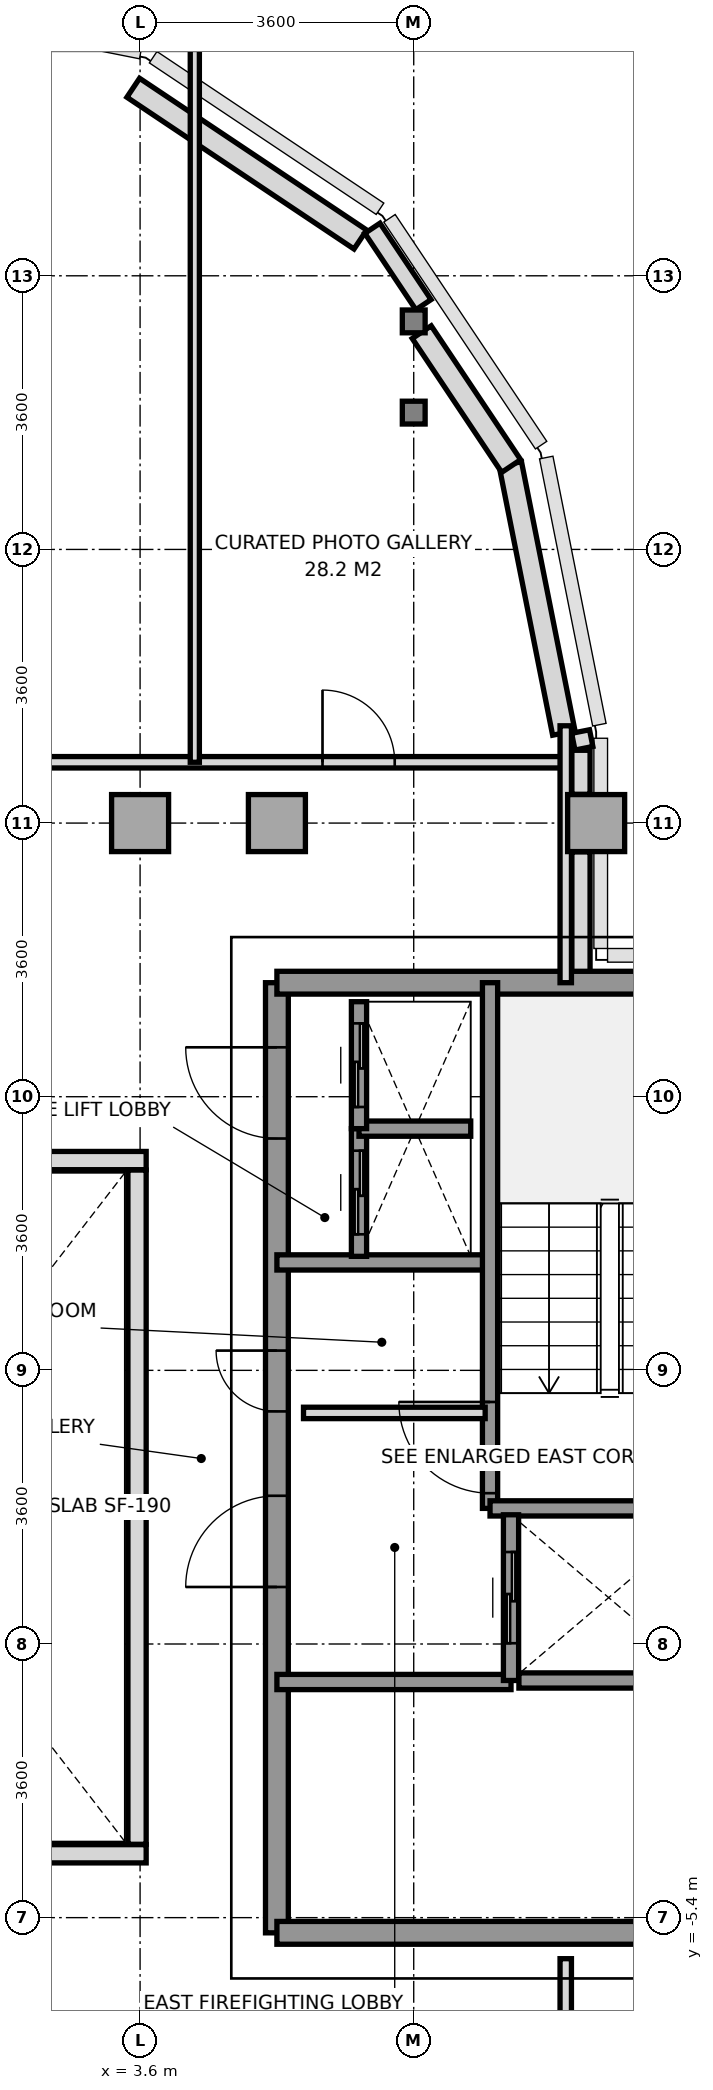
"""IFC4 building model, lengths in metres.
Left out: names, types, materials, properties, quantities, classifications, styles, units other than length and angle.
Written with IfcOpenShell. Run it as: python <this file> out.ifc"""

import sys

from ifc_helpers import new_model, si_unit, direction, frame, frame_2d, origin, origin_2d, place, context, subcontext, project, spatial, rectangle, i_section, extrude, source, transform, mapped, element, fill, save


model = new_model("IFC4")
c1 = context("Model", 3, precision=1e-05, world=origin(), true_north=direction((0.0, 1.0)))
c2 = subcontext(c1, "Body", "Model", "MODEL_VIEW")
j1 = project(units=[si_unit("LENGTHUNIT", "METRE"), si_unit("PLANEANGLEUNIT", "RADIAN")], contexts=[c1])
p1 = place(None, origin())
s1 = spatial("IfcSite", under=j1, at=p1, CompositionType="ELEMENT")
p2 = place(p1, origin())
s2 = spatial("IfcBuilding", under=s1, at=p2, CompositionType="ELEMENT")
p3 = place(p2, frame((0.0, 0.0, 242.8)))
s3 = spatial("IfcBuildingStorey", under=s2, at=p3, CompositionType="ELEMENT", Elevation=242.8)
m1 = source(origin(), c2, "Body", "SweptSolid", [
    extrude(rectangle(XDim=0.75, YDim=0.75, at=origin_2d()), origin(), (0.0, 0.0, 1.0), 3.01),
])
for number, where, z_axis, x_axis in (
    (1, (3.6, 9.0, 0.0), (0.0, 0.0, 1.0), (1.0, 0.0, 0.0)),
    (2, (5.4, 9.0, 0.0), (0.0, 0.0, 1.0), (1.0, 0.0, 0.0)),
):
    element("IfcColumn", number, at=place(p3, frame(where, z_axis=z_axis, x_axis=x_axis)), inside=s3, PredefinedType="COLUMN", context=c2, shape_type="MappedRepresentation", body=[
        mapped(m1, transform((0.0, 0.0, 0.0), x_axis=(1.0, 0.0, 0.0), y_axis=(0.0, 1.0, 0.0), z_axis=(0.0, 0.0, 1.0), scale=1.0)),
    ])
m2 = source(origin(), c2, "Body", "SweptSolid", [
    extrude(i_section(OverallWidth=0.3, OverallDepth=0.3, WebThickness=0.011, FlangeThickness=0.019, at=origin_2d()), origin(), (0.0, 0.0, 1.0), 3.01),
])
for number, where, z_axis, x_axis in (
    (3, (7.2, 14.4, 0.0), (0.0, 0.0, 1.0), (1.0, 0.0, 0.0)),
    (4, (7.2, 15.6, 0.0), (0.0, 0.0, 1.0), (1.0, 0.0, 0.0)),
):
    element("IfcColumn", number, at=place(p3, frame(where, z_axis=z_axis, x_axis=x_axis)), inside=s3, PredefinedType="COLUMN", context=c2, shape_type="MappedRepresentation", body=[
        mapped(m2, transform((0.0, 0.0, 0.0), x_axis=(1.0, 0.0, 0.0), y_axis=(0.0, 1.0, 0.0), z_axis=(0.0, 0.0, 1.0), scale=1.0)),
    ])
p4 = place(p3, frame((9.6, 9.0, 0.0), z_axis=(0.0, 0.0, 1.0), x_axis=(1.0, 0.0, 0.0)))
e5 = element("IfcColumn", 5, at=p4, inside=s3, PredefinedType="COLUMN", context=c2, shape_type="MappedRepresentation", body=[
    mapped(m1, transform((0.0, 0.0, 0.0), x_axis=(1.0, 0.0, 0.0), y_axis=(0.0, 1.0, 0.0), z_axis=(0.0, 0.0, 1.0), scale=1.0)),
])
p5 = place(p3, frame((9.175, 10.185, 0.0), z_axis=(0.0, 0.0, 1.0), x_axis=(-0.195114232679, 0.980780523974, 0.0)))
e6 = element("IfcWall", 6, at=p5, inside=s3, PredefinedType="SOLIDWALL", context=c2, shape_type="SweptSolid", body=[
    extrude(rectangle(XDim=3.609, YDim=0.3, at=frame_2d((1.804, 0.0))), origin(), (0.0, 0.0, 1.0), 3.01),
])
p6 = place(p3, frame((8.482, 13.698, 0.0), z_axis=(0.0, 0.0, 1.0), x_axis=(-0.555604299396, 0.831446848868, 0.0)))
e7 = element("IfcWall", 7, at=p6, inside=s3, PredefinedType="SOLIDWALL", context=c2, shape_type="SweptSolid", body=[
    extrude(rectangle(XDim=2.118, YDim=0.3, at=frame_2d((1.059, 0.0))), origin(), (0.0, 0.0, 1.0), 2.61),
])
p7 = place(p3, frame((6.498, 16.677, 0.0), z_axis=(0.0, 0.0, 1.0), x_axis=(-0.831443568068, 0.555609208993, 0.0)))
e8 = element("IfcWall", 8, at=p7, inside=s3, PredefinedType="SOLIDWALL", context=c2, shape_type="SweptSolid", body=[
    extrude(rectangle(XDim=3.594, YDim=0.3, at=frame_2d((1.797, 0.0))), origin(), (0.0, 0.0, 1.0), 3.01),
])
p8 = place(p3, frame((6.656, 16.825, 0.0), z_axis=(0.0, 0.0, 1.0), x_axis=(0.555585388542, -0.831459485506, 0.0)))
e9 = element("IfcWall", 9, at=p8, inside=s3, PredefinedType="PARAPET", context=c2, shape_type="SweptSolid", body=[
    extrude(rectangle(XDim=1.209, YDim=0.24, at=frame_2d((0.604, 0.0))), origin(), (0.0, 0.0, 1.0), 1.15),
])
p9 = place(p3, frame((9.395, 10.204, 0.0), z_axis=(0.0, 0.0, 1.0), x_axis=(0.194859894132, -0.980831087221, 0.0)))
e10 = element("IfcWall", 10, at=p9, inside=s3, PredefinedType="PARAPET", context=c2, shape_type="SweptSolid", body=[
    extrude(rectangle(XDim=0.224, YDim=0.24, at=frame_2d((0.112, 0.0))), origin(), (0.0, 0.0, 1.0), 1.15),
])
p10 = place(p3, frame((9.4, 9.958, 0.0), z_axis=(0.0, 0.0, 1.0), x_axis=(0.0, -1.0, 0.0)))
e11 = element("IfcWall", 11, at=p10, inside=s3, PredefinedType="PARAPET", context=c2, shape_type="SweptSolid", body=[
    extrude(rectangle(XDim=0.58, YDim=0.24, at=frame_2d((0.29, 0.0))), origin(), (0.0, 0.0, 1.0), 1.15),
])
p11 = place(p3, frame((9.4, 8.622, 0.0), z_axis=(0.0, 0.0, 1.0), x_axis=(0.0, -1.0, 0.0)))
e12 = element("IfcWall", 12, at=p11, inside=s3, PredefinedType="PARAPET", context=c2, shape_type="SweptSolid", body=[
    extrude(rectangle(XDim=1.669, YDim=0.24, at=frame_2d((0.834, 0.0))), origin(), (0.0, 0.0, 1.0), 1.15),
])
p12 = place(p3, frame((5.4, -5.6, 0.0), z_axis=(0.0, 0.0, 1.0), x_axis=(0.0, 1.0, 0.0)))
e13 = element("IfcWall", 13, at=p12, inside=s3, PredefinedType="SHEAR", context=c2, shape_type="SweptSolid", body=[
    extrude(rectangle(XDim=12.5, YDim=0.3, at=frame_2d((6.25, 0.0))), origin(), (0.0, 0.0, 1.0), 3.01),
])
p13 = place(p12, frame((4.55, 0.0, 0.0)))
e14 = element("IfcOpeningElement", 14, at=p13, cuts=e13, PredefinedType="OPENING", context=c2, shape_type="SweptSolid", body=[
    extrude(rectangle(XDim=1.2, YDim=2.2, at=frame_2d((0.6, 1.1))), frame((0.0, 0.16, 0.0), z_axis=(0.0, -1.0, 0.0), x_axis=(1.0, 0.0, 0.0)), (0.0, 0.0, 1.0), 0.32),
])
p14 = place(p12, frame((10.45, 0.0, 0.0)))
e15 = element("IfcOpeningElement", 15, at=p14, cuts=e13, PredefinedType="OPENING", context=c2, shape_type="SweptSolid", body=[
    extrude(rectangle(XDim=1.2, YDim=2.2, at=frame_2d((0.6, 1.1))), frame((0.0, 0.16, 0.0), z_axis=(0.0, -1.0, 0.0), x_axis=(1.0, 0.0, 0.0)), (0.0, 0.0, 1.0), 0.32),
])
p15 = place(p12, frame((6.86, 0.0, 0.0)))
e16 = element("IfcOpeningElement", 16, at=p15, cuts=e13, PredefinedType="OPENING", context=c2, shape_type="SweptSolid", body=[
    extrude(rectangle(XDim=0.8, YDim=2.1, at=frame_2d((0.4, 1.05))), frame((0.0, 0.16, 0.0), z_axis=(0.0, -1.0, 0.0), x_axis=(1.0, 0.0, 0.0)), (0.0, 0.0, 1.0), 0.32),
])
p16 = place(p3, frame((5.4, 6.9, 0.0), z_axis=(0.0, 0.0, 1.0), x_axis=(1.0, 0.0, 0.0)))
e17 = element("IfcWall", 17, at=p16, inside=s3, PredefinedType="SHEAR", context=c2, shape_type="SweptSolid", body=[
    extrude(rectangle(XDim=5.956, YDim=0.3, at=frame_2d((2.978, 0.0))), origin(), (0.0, 0.0, 1.0), 3.01),
])
p17 = place(p3, frame((5.4, -5.6, 0.0), z_axis=(0.0, 0.0, 1.0), x_axis=(1.0, 0.0, 0.0)))
e18 = element("IfcWall", 18, at=p17, inside=s3, PredefinedType="SHEAR", context=c2, shape_type="SweptSolid", body=[
    extrude(rectangle(XDim=7.8, YDim=0.3, at=frame_2d((3.9, 0.0))), origin(), (0.0, 0.0, 1.0), 3.01),
])
p18 = place(p3, frame((5.4, 3.22, 0.0), z_axis=(0.0, 0.0, 1.0), x_axis=(1.0, 0.0, 0.0)))
e19 = element("IfcWall", 19, at=p18, inside=s3, PredefinedType="SOLIDWALL", context=c2, shape_type="SweptSolid", body=[
    extrude(rectangle(XDim=2.78, YDim=0.2, at=frame_2d((1.39, 0.0))), origin(), (0.0, 0.0, 1.0), 3.01),
])
p19 = place(p3, frame((5.4, -2.3, 0.0), z_axis=(0.0, 0.0, 1.0), x_axis=(1.0, 0.0, 0.0)))
e20 = element("IfcWall", 20, at=p19, inside=s3, PredefinedType="SOLIDWALL", context=c2, shape_type="SweptSolid", body=[
    extrude(rectangle(XDim=3.08, YDim=0.2, at=frame_2d((1.54, 0.0))), origin(), (0.0, 0.0, 1.0), 3.01),
])
p20 = place(p3, frame((8.204, -0.016, 0.0), z_axis=(0.0, 0.0, 1.0), x_axis=(0.0, 1.0, 0.0)))
e21 = element("IfcWall", 21, at=p20, inside=s3, PredefinedType="SOLIDWALL", context=c2, shape_type="SweptSolid", body=[
    extrude(rectangle(XDim=6.916, YDim=0.2, at=frame_2d((3.458, 0.0))), origin(), (0.0, 0.0, 1.0), 3.01),
])
p21 = place(p20, frame((0.2, 0.0, 0.0)))
e22 = element("IfcOpeningElement", 22, at=p21, cuts=e21, PredefinedType="OPENING", context=c2, shape_type="SweptSolid", body=[
    extrude(rectangle(XDim=1.2, YDim=2.2, at=frame_2d((0.6, 1.1))), frame((0.0, 0.11, 0.0), z_axis=(0.0, -1.0, 0.0), x_axis=(1.0, 0.0, 0.0)), (0.0, 0.0, 1.0), 0.22),
])
p22 = place(p3, frame((8.204, -0.016, 0.0), z_axis=(0.0, 0.0, 1.0), x_axis=(1.0, 0.0, 0.0)))
e23 = element("IfcWall", 23, at=p22, inside=s3, PredefinedType="SOLIDWALL", context=c2, shape_type="SweptSolid", body=[
    extrude(rectangle(XDim=3.152, YDim=0.2, at=frame_2d((1.576, 0.0))), origin(), (0.0, 0.0, 1.0), 3.01),
])
p23 = place(p3, frame((8.48, -2.28, 0.0), z_axis=(0.0, 0.0, 1.0), x_axis=(0.0, 1.0, 0.0)))
e24 = element("IfcWall", 24, at=p23, inside=s3, PredefinedType="SOLIDWALL", context=c2, shape_type="SweptSolid", body=[
    extrude(rectangle(XDim=2.18, YDim=0.2, at=frame_2d((1.09, 0.0))), origin(), (0.0, 0.0, 1.0), 3.01),
])
p24 = place(p23, frame((0.49, 0.0, 0.0)))
e25 = element("IfcOpeningElement", 25, at=p24, cuts=e24, PredefinedType="OPENING", context=c2, shape_type="SweptSolid", body=[
    extrude(rectangle(XDim=1.2, YDim=2.2, at=frame_2d((0.6, 1.1))), frame((0.0, 0.11, 0.0), z_axis=(0.0, -1.0, 0.0), x_axis=(1.0, 0.0, 0.0)), (0.0, 0.0, 1.0), 0.22),
])
p25 = place(p3, frame((8.584, -2.28, 0.0), z_axis=(0.0, 0.0, 1.0), x_axis=(1.0, 0.0, 0.0)))
e26 = element("IfcWall", 26, at=p25, inside=s3, PredefinedType="SOLIDWALL", context=c2, shape_type="SweptSolid", body=[
    extrude(rectangle(XDim=2.362, YDim=0.2, at=frame_2d((1.181, 0.0))), origin(), (0.0, 0.0, 1.0), 3.01),
])
p26 = place(p3, frame((6.48, 3.3, 0.0), z_axis=(0.0, 0.0, 1.0), x_axis=(0.0, 1.0, 0.0)))
e27 = element("IfcWall", 27, at=p26, inside=s3, PredefinedType="SOLIDWALL", context=c2, shape_type="SweptSolid", body=[
    extrude(rectangle(XDim=1.68, YDim=0.2, at=frame_2d((0.84, 0.0))), origin(), (0.0, 0.0, 1.0), 3.01),
])
p27 = place(p26, frame((0.29, 0.0, 0.0)))
e28 = element("IfcOpeningElement", 28, at=p27, cuts=e27, PredefinedType="OPENING", context=c2, shape_type="SweptSolid", body=[
    extrude(rectangle(XDim=1.1, YDim=2.2, at=frame_2d((0.55, 1.1))), frame((0.0, 0.11, 0.0), z_axis=(0.0, -1.0, 0.0), x_axis=(1.0, 0.0, 0.0)), (0.0, 0.0, 1.0), 0.22),
])
p28 = place(p3, frame((6.48, 4.98, 0.0), z_axis=(0.0, 0.0, 1.0), x_axis=(1.0, 0.0, 0.0)))
e29 = element("IfcWall", 29, at=p28, inside=s3, PredefinedType="SOLIDWALL", context=c2, shape_type="SweptSolid", body=[
    extrude(rectangle(XDim=1.47, YDim=0.2, at=frame_2d((0.735, 0.0))), origin(), (0.0, 0.0, 1.0), 3.01),
])
p29 = place(p3, frame((6.48, 4.98, 0.0), z_axis=(0.0, 0.0, 1.0), x_axis=(0.0, 1.0, 0.0)))
e30 = element("IfcWall", 30, at=p29, inside=s3, PredefinedType="SOLIDWALL", context=c2, shape_type="SweptSolid", body=[
    extrude(rectangle(XDim=1.67, YDim=0.2, at=frame_2d((0.835, 0.0))), origin(), (0.0, 0.0, 1.0), 3.01),
])
p30 = place(p29, frame((0.285, 0.0, 0.0)))
e31 = element("IfcOpeningElement", 31, at=p30, cuts=e30, PredefinedType="OPENING", context=c2, shape_type="SweptSolid", body=[
    extrude(rectangle(XDim=1.1, YDim=2.2, at=frame_2d((0.55, 1.1))), frame((0.0, 0.11, 0.0), z_axis=(0.0, -1.0, 0.0), x_axis=(1.0, 0.0, 0.0)), (0.0, 0.0, 1.0), 0.22),
])
p31 = place(p3, frame((5.75, 1.24, 0.0), z_axis=(0.0, 0.0, 1.0), x_axis=(1.0, 0.0, 0.0)))
e32 = element("IfcWall", 32, at=p31, inside=s3, PredefinedType="PARTITIONING", context=c2, shape_type="SweptSolid", body=[
    extrude(rectangle(XDim=2.39, YDim=0.15, at=frame_2d((1.195, 0.0))), origin(), (0.0, 0.0, 1.0), 3.01),
])
p32 = place(p3, frame((-9.2, 9.8, 0.0), z_axis=(0.0, 0.0, 1.0), x_axis=(1.0, 0.0, 0.0)))
e33 = element("IfcWall", 33, at=p32, inside=s3, PredefinedType="PARTITIONING", context=c2, shape_type="SweptSolid", body=[
    extrude(rectangle(XDim=18.4, YDim=0.15, at=frame_2d((9.2, 0.0))), origin(), (0.0, 0.0, 1.0), 3.01),
])
p33 = place(p32, frame((2.2, 0.0, 0.0)))
e34 = element("IfcOpeningElement", 34, at=p33, cuts=e33, PredefinedType="OPENING", context=c2, shape_type="SweptSolid", body=[
    extrude(rectangle(XDim=0.95, YDim=2.15, at=frame_2d((0.475, 1.075))), frame((0.0, 0.085, 0.0), z_axis=(0.0, -1.0, 0.0), x_axis=(1.0, 0.0, 0.0)), (0.0, 0.0, 1.0), 0.17),
])
p34 = place(p32, frame((8.8, 0.0, 0.0)))
e35 = element("IfcOpeningElement", 35, at=p34, cuts=e33, PredefinedType="OPENING", context=c2, shape_type="SweptSolid", body=[
    extrude(rectangle(XDim=1.1, YDim=2.2, at=frame_2d((0.55, 1.1))), frame((0.0, 0.085, 0.0), z_axis=(0.0, -1.0, 0.0), x_axis=(1.0, 0.0, 0.0)), (0.0, 0.0, 1.0), 0.17),
])
p35 = place(p32, frame((15.2, 0.0, 0.0)))
e36 = element("IfcOpeningElement", 36, at=p35, cuts=e33, PredefinedType="OPENING", context=c2, shape_type="SweptSolid", body=[
    extrude(rectangle(XDim=0.95, YDim=2.15, at=frame_2d((0.475, 1.075))), frame((0.0, 0.085, 0.0), z_axis=(0.0, -1.0, 0.0), x_axis=(1.0, 0.0, 0.0)), (0.0, 0.0, 1.0), 0.17),
])
p36 = place(p3, frame((9.2, 6.9, 0.0), z_axis=(0.0, 0.0, 1.0), x_axis=(0.0, 1.0, 0.0)))
e37 = element("IfcWall", 37, at=p36, inside=s3, PredefinedType="PARTITIONING", context=c2, shape_type="SweptSolid", body=[
    extrude(rectangle(XDim=3.38, YDim=0.15, at=frame_2d((1.69, 0.0))), origin(), (0.0, 0.0, 1.0), 2.61),
])
p37 = place(p3, frame((4.32, 9.8, 0.0), z_axis=(0.0, 0.0, 1.0), x_axis=(0.0, 1.0, 0.0)))
e38 = element("IfcWall", 38, at=p37, inside=s3, PredefinedType="PARTITIONING", context=c2, shape_type="SweptSolid", body=[
    extrude(rectangle(XDim=9.45, YDim=0.12, at=frame_2d((4.725, 0.0))), origin(), (0.0, 0.0, 1.0), 2.61),
])
p38 = place(p3, frame((9.2, -10.28, 0.0), z_axis=(0.0, 0.0, 1.0), x_axis=(0.0, 1.0, 0.0)))
e39 = element("IfcWall", 39, at=p38, inside=s3, PredefinedType="PARTITIONING", context=c2, shape_type="SweptSolid", body=[
    extrude(rectangle(XDim=4.34, YDim=0.15, at=frame_2d((2.17, 0.0))), origin(), (0.0, 0.0, 1.0), 2.61),
])
for number, where, z_axis, x_axis in (
    (40, (-3.68, -4.56, 0.0), (0.0, 0.0, 1.0), (1.0, 0.0, 0.0)),
    (41, (-3.68, 4.56, 0.0), (0.0, 0.0, 1.0), (1.0, 0.0, 0.0)),
):
    element("IfcWall", number, at=place(p3, frame(where, z_axis=z_axis, x_axis=x_axis)), inside=s3, PredefinedType="PARAPET", context=c2, shape_type="SweptSolid", body=[
        extrude(rectangle(XDim=7.36, YDim=0.24, at=frame_2d((3.68, 0.0))), origin(), (0.0, 0.0, 1.0), 1.15),
    ])
p39 = place(p3, frame((3.56, -4.435, 0.0), z_axis=(0.0, 0.0, 1.0), x_axis=(0.0, 1.0, 0.0)))
e42 = element("IfcWall", 42, at=p39, inside=s3, PredefinedType="PARAPET", context=c2, shape_type="SweptSolid", body=[
    extrude(rectangle(XDim=8.87, YDim=0.24, at=frame_2d((4.435, 0.0))), origin(), (0.0, 0.0, 1.0), 1.15),
])
m3 = source(origin(), c2, "Body", "SweptSolid", [
    extrude(rectangle(XDim=1.2, YDim=2.2, at=frame_2d((0.6, 1.1))), frame((0.0, 0.025, 0.0), z_axis=(0.0, -1.0, 0.0), x_axis=(1.0, 0.0, 0.0)), (0.0, 0.0, 1.0), 0.05),
])
p40 = place(p21, origin())
e43 = element("IfcDoor", 43, at=p40, inside=s3, OperationType="SINGLE_SWING_RIGHT", PredefinedType="DOOR", context=c2, shape_type="MappedRepresentation", body=[
    mapped(m3, transform((0.0, 0.0, 0.0), x_axis=(1.0, 0.0, 0.0), y_axis=(0.0, 1.0, 0.0), z_axis=(0.0, 0.0, 1.0), scale=1.0)),
])
fill(e22, e43)
p41 = place(p13, origin())
e44 = element("IfcDoor", 44, at=p41, inside=s3, OperationType="SINGLE_SWING_LEFT", PredefinedType="DOOR", context=c2, shape_type="MappedRepresentation", body=[
    mapped(m3, transform((0.0, 0.0, 0.0), x_axis=(1.0, 0.0, 0.0), y_axis=(0.0, 1.0, 0.0), z_axis=(0.0, 0.0, 1.0), scale=1.0)),
])
fill(e14, e44)
p42 = place(p14, origin())
e45 = element("IfcDoor", 45, at=p42, inside=s3, OperationType="SINGLE_SWING_RIGHT", PredefinedType="DOOR", context=c2, shape_type="MappedRepresentation", body=[
    mapped(m3, transform((0.0, 0.0, 0.0), x_axis=(1.0, 0.0, 0.0), y_axis=(0.0, 1.0, 0.0), z_axis=(0.0, 0.0, 1.0), scale=1.0)),
])
fill(e15, e45)
m4 = source(origin(), c2, "Body", "SweptSolid", [
    extrude(rectangle(XDim=0.8, YDim=2.1, at=frame_2d((0.4, 1.05))), frame((0.0, 0.025, 0.0), z_axis=(0.0, -1.0, 0.0), x_axis=(1.0, 0.0, 0.0)), (0.0, 0.0, 1.0), 0.05),
])
p43 = place(p15, origin())
e46 = element("IfcDoor", 46, at=p43, inside=s3, OperationType="SINGLE_SWING_RIGHT", PredefinedType="DOOR", context=c2, shape_type="MappedRepresentation", body=[
    mapped(m4, transform((0.0, 0.0, 0.0), x_axis=(1.0, 0.0, 0.0), y_axis=(0.0, 1.0, 0.0), z_axis=(0.0, 0.0, 1.0), scale=1.0)),
])
fill(e16, e46)
p44 = place(p24, origin())
e47 = element("IfcDoor", 47, at=p44, inside=s3, OperationType="SLIDING_TO_RIGHT", PredefinedType="DOOR", context=c2, shape_type="MappedRepresentation", body=[
    mapped(m3, transform((0.0, 0.0, 0.0), x_axis=(1.0, 0.0, 0.0), y_axis=(0.0, 1.0, 0.0), z_axis=(0.0, 0.0, 1.0), scale=1.0)),
])
fill(e25, e47)
m5 = source(origin(), c2, "Body", "SweptSolid", [
    extrude(rectangle(XDim=1.1, YDim=2.2, at=frame_2d((0.55, 1.1))), frame((0.0, 0.025, 0.0), z_axis=(0.0, -1.0, 0.0), x_axis=(1.0, 0.0, 0.0)), (0.0, 0.0, 1.0), 0.05),
])
p45 = place(p27, origin())
e48 = element("IfcDoor", 48, at=p45, inside=s3, OperationType="SLIDING_TO_LEFT", PredefinedType="DOOR", context=c2, shape_type="MappedRepresentation", body=[
    mapped(m5, transform((0.0, 0.0, 0.0), x_axis=(1.0, 0.0, 0.0), y_axis=(0.0, 1.0, 0.0), z_axis=(0.0, 0.0, 1.0), scale=1.0)),
])
fill(e28, e48)
p46 = place(p30, origin())
e49 = element("IfcDoor", 49, at=p46, inside=s3, OperationType="SLIDING_TO_LEFT", PredefinedType="DOOR", context=c2, shape_type="MappedRepresentation", body=[
    mapped(m5, transform((0.0, 0.0, 0.0), x_axis=(1.0, 0.0, 0.0), y_axis=(0.0, 1.0, 0.0), z_axis=(0.0, 0.0, 1.0), scale=1.0)),
])
fill(e31, e49)
m6 = source(origin(), c2, "Body", "SweptSolid", [
    extrude(rectangle(XDim=0.95, YDim=2.15, at=frame_2d((0.475, 1.075))), frame((0.0, 0.025, 0.0), z_axis=(0.0, -1.0, 0.0), x_axis=(1.0, 0.0, 0.0)), (0.0, 0.0, 1.0), 0.05),
])
p47 = place(p35, origin())
e50 = element("IfcDoor", 50, at=p47, inside=s3, OperationType="SINGLE_SWING_LEFT", PredefinedType="DOOR", context=c2, shape_type="MappedRepresentation", body=[
    mapped(m6, transform((0.0, 0.0, 0.0), x_axis=(1.0, 0.0, 0.0), y_axis=(0.0, 1.0, 0.0), z_axis=(0.0, 0.0, 1.0), scale=1.0)),
])
fill(e36, e50)
save(model, sys.argv[1])
